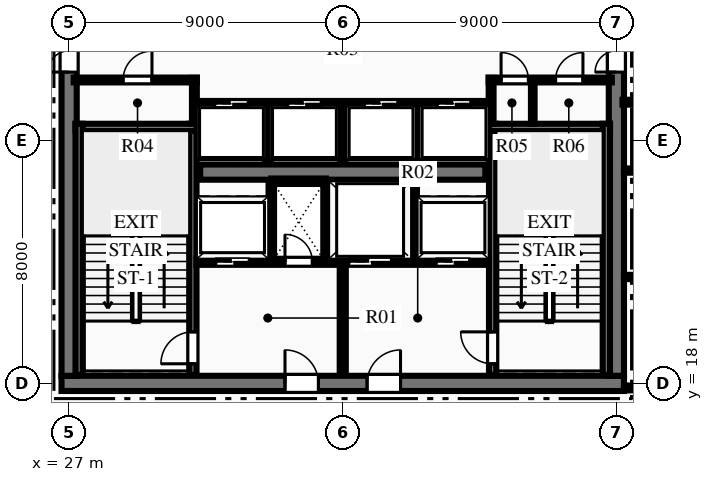
"""IFC4 building model, lengths in metres.
Left out: names, types, materials, properties, quantities, classifications, styles, units other than length and angle.
Written with IfcOpenShell. Run it as: python <this file> out.ifc"""

import sys

from ifc_helpers import new_model, si_unit, direction, frame, frame_2d, origin, place, context, subcontext, project, spatial, rectangle, extrude, element, fill, save


model = new_model("IFC4")
c1 = context("Model", 3, precision=1e-05, world=origin(), true_north=direction((0.0, 1.0)))
c2 = subcontext(c1, "Body", "Model", "MODEL_VIEW")
j1 = project(units=[si_unit("LENGTHUNIT", "METRE"), si_unit("PLANEANGLEUNIT", "RADIAN")], contexts=[c1])
p1 = place(None, origin())
s1 = spatial("IfcSite", under=j1, at=p1, CompositionType="ELEMENT")
p2 = place(p1, origin())
s2 = spatial("IfcBuilding", under=s1, at=p2, CompositionType="ELEMENT")
p3 = place(p2, frame((0.0, 0.0, 148.2)))
s3 = spatial("IfcBuildingStorey", under=s2, at=p3, CompositionType="ELEMENT", Elevation=148.2)
p4 = place(p3, frame((26.75, 18.0, 0.0), z_axis=(0.0, 0.0, 1.0), x_axis=(1.0, 0.0, 0.0)))
e1 = element("IfcWall", 1, at=p4, inside=s3, PredefinedType="SHEAR", context=c2, shape_type="SweptSolid", body=[
    extrude(rectangle(XDim=18.5, YDim=0.5, at=frame_2d((9.25, 0.0))), origin(), (0.0, 0.0, 1.0), 3.75),
])
p5 = place(p4, frame((7.35, 0.0, 0.0)))
e2 = element("IfcOpeningElement", 2, at=p5, cuts=e1, PredefinedType="OPENING", context=c2, shape_type="SweptSolid", body=[
    extrude(rectangle(XDim=1.1, YDim=2.15, at=frame_2d((0.55, 1.075))), frame((0.0, 0.26, 0.0), z_axis=(0.0, -1.0, 0.0), x_axis=(1.0, 0.0, 0.0)), (0.0, 0.0, 1.0), 0.52),
])
p6 = place(p4, frame((10.05, 0.0, 0.0)))
e3 = element("IfcOpeningElement", 3, at=p6, cuts=e1, PredefinedType="OPENING", context=c2, shape_type="SweptSolid", body=[
    extrude(rectangle(XDim=1.1, YDim=2.15, at=frame_2d((0.55, 1.075))), frame((0.0, 0.26, 0.0), z_axis=(0.0, -1.0, 0.0), x_axis=(1.0, 0.0, 0.0)), (0.0, 0.0, 1.0), 0.52),
])
p7 = place(p3, frame((27.0, 18.25, 0.0), z_axis=(0.0, 0.0, 1.0), x_axis=(0.0, 1.0, 0.0)))
e4 = element("IfcWall", 4, at=p7, inside=s3, PredefinedType="SHEAR", context=c2, shape_type="SweptSolid", body=[
    extrude(rectangle(XDim=15.5, YDim=0.5, at=frame_2d((7.75, 0.0))), origin(), (0.0, 0.0, 1.0), 3.75),
])
p8 = place(p7, frame((9.99, 0.0, 0.0)))
e5 = element("IfcOpeningElement", 5, at=p8, cuts=e4, PredefinedType="OPENING", context=c2, shape_type="SweptSolid", body=[
    extrude(rectangle(XDim=1.4, YDim=2.2, at=frame_2d((0.7, 1.1))), frame((0.0, 0.26, 0.0), z_axis=(0.0, -1.0, 0.0), x_axis=(1.0, 0.0, 0.0)), (0.0, 0.0, 1.0), 0.52),
])
p9 = place(p3, frame((45.0, 18.25, 0.0), z_axis=(0.0, 0.0, 1.0), x_axis=(0.0, 1.0, 0.0)))
e6 = element("IfcWall", 6, at=p9, inside=s3, PredefinedType="SHEAR", context=c2, shape_type="SweptSolid", body=[
    extrude(rectangle(XDim=15.5, YDim=0.5, at=frame_2d((7.75, 0.0))), origin(), (0.0, 0.0, 1.0), 3.75),
])
p10 = place(p9, frame((9.99, 0.0, 0.0)))
e7 = element("IfcOpeningElement", 7, at=p10, cuts=e6, PredefinedType="OPENING", context=c2, shape_type="SweptSolid", body=[
    extrude(rectangle(XDim=1.4, YDim=2.2, at=frame_2d((0.7, 1.1))), frame((0.0, 0.26, 0.0), z_axis=(0.0, -1.0, 0.0), x_axis=(1.0, 0.0, 0.0)), (0.0, 0.0, 1.0), 0.52),
])
p11 = place(p3, frame((31.31, 24.95, 0.0), z_axis=(0.0, 0.0, 1.0), x_axis=(1.0, 0.0, 0.0)))
e8 = element("IfcWall", 8, at=p11, inside=s3, PredefinedType="SHEAR", context=c2, shape_type="SweptSolid", body=[
    extrude(rectangle(XDim=9.38, YDim=0.5, at=frame_2d((4.69, 0.0))), origin(), (0.0, 0.0, 1.0), 3.75),
])
p12 = place(p3, frame((31.07, 18.28, 0.0), z_axis=(0.0, 0.0, 1.0), x_axis=(0.0, 1.0, 0.0)))
e9 = element("IfcWall", 9, at=p12, inside=s3, PredefinedType="SHEAR", context=c2, shape_type="SweptSolid", body=[
    extrude(rectangle(XDim=8.26, YDim=0.24, at=frame_2d((4.13, 0.0))), origin(), (0.0, 0.0, 1.0), 3.75),
])
p13 = place(p12, frame((0.365, 0.0, 0.0)))
e10 = element("IfcOpeningElement", 10, at=p13, cuts=e9, PredefinedType="OPENING", context=c2, shape_type="SweptSolid", body=[
    extrude(rectangle(XDim=1.05, YDim=2.15, at=frame_2d((0.525, 1.075))), frame((0.0, 0.13, 0.0), z_axis=(0.0, -1.0, 0.0), x_axis=(1.0, 0.0, 0.0)), (0.0, 0.0, 1.0), 0.26),
])
p14 = place(p3, frame((27.21, 26.42, 0.0), z_axis=(0.0, 0.0, 1.0), x_axis=(1.0, 0.0, 0.0)))
e11 = element("IfcWall", 11, at=p14, inside=s3, PredefinedType="SHEAR", context=c2, shape_type="SweptSolid", body=[
    extrude(rectangle(XDim=3.98, YDim=0.24, at=frame_2d((1.99, 0.0))), origin(), (0.0, 0.0, 1.0), 3.75),
])
p15 = place(p3, frame((27.33, 18.28, 0.0), z_axis=(0.0, 0.0, 1.0), x_axis=(0.0, 1.0, 0.0)))
e12 = element("IfcWall", 12, at=p15, inside=s3, PredefinedType="SHEAR", context=c2, shape_type="SweptSolid", body=[
    extrude(rectangle(XDim=8.26, YDim=0.24, at=frame_2d((4.13, 0.0))), origin(), (0.0, 0.0, 1.0), 3.75),
])
p16 = place(p3, frame((40.93, 18.28, 0.0), z_axis=(0.0, 0.0, 1.0), x_axis=(0.0, 1.0, 0.0)))
e13 = element("IfcWall", 13, at=p16, inside=s3, PredefinedType="SHEAR", context=c2, shape_type="SweptSolid", body=[
    extrude(rectangle(XDim=8.26, YDim=0.24, at=frame_2d((4.13, 0.0))), origin(), (0.0, 0.0, 1.0), 3.75),
])
p17 = place(p16, frame((0.365, 0.0, 0.0)))
e14 = element("IfcOpeningElement", 14, at=p17, cuts=e13, PredefinedType="OPENING", context=c2, shape_type="SweptSolid", body=[
    extrude(rectangle(XDim=1.05, YDim=2.15, at=frame_2d((0.525, 1.075))), frame((0.0, 0.13, 0.0), z_axis=(0.0, -1.0, 0.0), x_axis=(1.0, 0.0, 0.0)), (0.0, 0.0, 1.0), 0.26),
])
p18 = place(p3, frame((40.81, 26.42, 0.0), z_axis=(0.0, 0.0, 1.0), x_axis=(1.0, 0.0, 0.0)))
e15 = element("IfcWall", 15, at=p18, inside=s3, PredefinedType="SHEAR", context=c2, shape_type="SweptSolid", body=[
    extrude(rectangle(XDim=3.98, YDim=0.24, at=frame_2d((1.99, 0.0))), origin(), (0.0, 0.0, 1.0), 3.75),
])
p19 = place(p3, frame((44.67, 18.28, 0.0), z_axis=(0.0, 0.0, 1.0), x_axis=(0.0, 1.0, 0.0)))
e16 = element("IfcWall", 16, at=p19, inside=s3, PredefinedType="SHEAR", context=c2, shape_type="SweptSolid", body=[
    extrude(rectangle(XDim=8.26, YDim=0.24, at=frame_2d((4.13, 0.0))), origin(), (0.0, 0.0, 1.0), 3.75),
])
p20 = place(p3, frame((36.0, 18.28, 0.0), z_axis=(0.0, 0.0, 1.0), x_axis=(0.0, 1.0, 0.0)))
e17 = element("IfcWall", 17, at=p20, inside=s3, PredefinedType="PARTITIONING", context=c2, shape_type="SweptSolid", body=[
    extrude(rectangle(XDim=3.77, YDim=0.2, at=frame_2d((1.885, 0.0))), origin(), (0.0, 0.0, 1.0), 3.46),
])
p21 = place(p3, frame((31.19, 22.0, 0.0), z_axis=(0.0, 0.0, 1.0), x_axis=(1.0, 0.0, 0.0)))
e18 = element("IfcWall", 18, at=p21, inside=s3, PredefinedType="PARTITIONING", context=c2, shape_type="SweptSolid", body=[
    extrude(rectangle(XDim=4.69, YDim=0.2, at=frame_2d((2.345, 0.0))), origin(), (0.0, 0.0, 1.0), 3.46),
])
p22 = place(p21, frame((2.91, 0.0, 0.0)))
e19 = element("IfcOpeningElement", 19, at=p22, cuts=e18, PredefinedType="OPENING", context=c2, shape_type="SweptSolid", body=[
    extrude(rectangle(XDim=0.9, YDim=2.15, at=frame_2d((0.45, 1.075))), frame((0.0, 0.11, 0.0), z_axis=(0.0, -1.0, 0.0), x_axis=(1.0, 0.0, 0.0)), (0.0, 0.0, 1.0), 0.22),
])
p23 = place(p21, frame((0.635, 0.0, 0.0)))
e20 = element("IfcOpeningElement", 20, at=p23, cuts=e18, PredefinedType="OPENING", context=c2, shape_type="SweptSolid", body=[
    extrude(rectangle(XDim=1.1, YDim=2.15, at=frame_2d((0.55, 1.075))), frame((0.0, 0.11, 0.0), z_axis=(0.0, -1.0, 0.0), x_axis=(1.0, 0.0, 0.0)), (0.0, 0.0, 1.0), 0.22),
])
p24 = place(p3, frame((36.12, 22.0, 0.0), z_axis=(0.0, 0.0, 1.0), x_axis=(1.0, 0.0, 0.0)))
e21 = element("IfcWall", 21, at=p24, inside=s3, PredefinedType="PARTITIONING", context=c2, shape_type="SweptSolid", body=[
    extrude(rectangle(XDim=4.69, YDim=0.2, at=frame_2d((2.345, 0.0))), origin(), (0.0, 0.0, 1.0), 3.46),
])
p25 = place(p24, frame((2.955, 0.0, 0.0)))
e22 = element("IfcOpeningElement", 22, at=p25, cuts=e21, PredefinedType="OPENING", context=c2, shape_type="SweptSolid", body=[
    extrude(rectangle(XDim=1.1, YDim=2.15, at=frame_2d((0.55, 1.075))), frame((0.0, 0.11, 0.0), z_axis=(0.0, -1.0, 0.0), x_axis=(1.0, 0.0, 0.0)), (0.0, 0.0, 1.0), 0.22),
])
p26 = place(p24, frame((0.08, 0.0, 0.0)))
e23 = element("IfcOpeningElement", 23, at=p26, cuts=e21, PredefinedType="OPENING", context=c2, shape_type="SweptSolid", body=[
    extrude(rectangle(XDim=1.4, YDim=2.2, at=frame_2d((0.7, 1.1))), frame((0.0, 0.11, 0.0), z_axis=(0.0, -1.0, 0.0), x_axis=(1.0, 0.0, 0.0)), (0.0, 0.0, 1.0), 0.22),
])
for number, where, z_axis, x_axis in (
    (24, (33.65, 22.05, 0.0), (0.0, 0.0, 1.0), (0.0, 1.0, 0.0)),
    (25, (35.45, 22.05, 0.0), (0.0, 0.0, 1.0), (0.0, 1.0, 0.0)),
):
    element("IfcWall", number, at=place(p3, frame(where, z_axis=z_axis, x_axis=x_axis)), inside=s3, PredefinedType="PARTITIONING", context=c2, shape_type="SweptSolid", body=[
        extrude(rectangle(XDim=2.6, YDim=0.18, at=frame_2d((1.3, 0.0))), origin(), (0.0, 0.0, 1.0), 3.46),
    ])
p27 = place(p3, frame((33.65, 24.65, 0.0), z_axis=(0.0, 0.0, 1.0), x_axis=(1.0, 0.0, 0.0)))
e26 = element("IfcWall", 26, at=p27, inside=s3, PredefinedType="PARTITIONING", context=c2, shape_type="SweptSolid", body=[
    extrude(rectangle(XDim=1.8, YDim=0.18, at=frame_2d((0.9, 0.0))), origin(), (0.0, 0.0, 1.0), 3.46),
])
p28 = place(p3, frame((38.35, 22.05, 0.0), z_axis=(0.0, 0.0, 1.0), x_axis=(0.0, 1.0, 0.0)))
e27 = element("IfcWall", 27, at=p28, inside=s3, PredefinedType="PARTITIONING", context=c2, shape_type="SweptSolid", body=[
    extrude(rectangle(XDim=2.6, YDim=0.18, at=frame_2d((1.3, 0.0))), origin(), (0.0, 0.0, 1.0), 3.46),
])
p29 = place(p3, frame((27.15, 27.98, 0.0), z_axis=(0.0, 0.0, 1.0), x_axis=(1.0, 0.0, 0.0)))
e28 = element("IfcWall", 28, at=p29, inside=s3, PredefinedType="PARTITIONING", context=c2, shape_type="SweptSolid", body=[
    extrude(rectangle(XDim=4.05, YDim=0.16, at=frame_2d((2.025, 0.0))), origin(), (0.0, 0.0, 1.0), 3.46),
])
p30 = place(p29, frame((1.625, 0.0, 0.0)))
e29 = element("IfcOpeningElement", 29, at=p30, cuts=e28, PredefinedType="OPENING", context=c2, shape_type="SweptSolid", body=[
    extrude(rectangle(XDim=0.95, YDim=2.15, at=frame_2d((0.475, 1.075))), frame((0.0, 0.09, 0.0), z_axis=(0.0, -1.0, 0.0), x_axis=(1.0, 0.0, 0.0)), (0.0, 0.0, 1.0), 0.18),
])
p31 = place(p3, frame((31.12, 26.54, 0.0), z_axis=(0.0, 0.0, 1.0), x_axis=(0.0, 1.0, 0.0)))
e30 = element("IfcWall", 30, at=p31, inside=s3, PredefinedType="PARTITIONING", context=c2, shape_type="SweptSolid", body=[
    extrude(rectangle(XDim=1.51, YDim=0.16, at=frame_2d((0.755, 0.0))), origin(), (0.0, 0.0, 1.0), 3.46),
])
p32 = place(p3, frame((40.8, 27.98, 0.0), z_axis=(0.0, 0.0, 1.0), x_axis=(1.0, 0.0, 0.0)))
e31 = element("IfcWall", 31, at=p32, inside=s3, PredefinedType="PARTITIONING", context=c2, shape_type="SweptSolid", body=[
    extrude(rectangle(XDim=4.05, YDim=0.16, at=frame_2d((2.025, 0.0))), origin(), (0.0, 0.0, 1.0), 3.46),
])
p33 = place(p32, frame((0.407, 0.0, 0.0)))
e32 = element("IfcOpeningElement", 32, at=p33, cuts=e31, PredefinedType="OPENING", context=c2, shape_type="SweptSolid", body=[
    extrude(rectangle(XDim=0.9, YDim=2.15, at=frame_2d((0.45, 1.075))), frame((0.0, 0.09, 0.0), z_axis=(0.0, -1.0, 0.0), x_axis=(1.0, 0.0, 0.0)), (0.0, 0.0, 1.0), 0.18),
])
p34 = place(p32, frame((2.2, 0.0, 0.0)))
e33 = element("IfcOpeningElement", 33, at=p34, cuts=e31, PredefinedType="OPENING", context=c2, shape_type="SweptSolid", body=[
    extrude(rectangle(XDim=0.9, YDim=2.15, at=frame_2d((0.45, 1.075))), frame((0.0, 0.09, 0.0), z_axis=(0.0, -1.0, 0.0), x_axis=(1.0, 0.0, 0.0)), (0.0, 0.0, 1.0), 0.18),
])
p35 = place(p3, frame((40.88, 26.54, 0.0), z_axis=(0.0, 0.0, 1.0), x_axis=(0.0, 1.0, 0.0)))
e34 = element("IfcWall", 34, at=p35, inside=s3, PredefinedType="PARTITIONING", context=c2, shape_type="SweptSolid", body=[
    extrude(rectangle(XDim=1.51, YDim=0.16, at=frame_2d((0.755, 0.0))), origin(), (0.0, 0.0, 1.0), 3.46),
])
p36 = place(p3, frame((42.25, 26.54, 0.0), z_axis=(0.0, 0.0, 1.0), x_axis=(0.0, 1.0, 0.0)))
e35 = element("IfcWall", 35, at=p36, inside=s3, PredefinedType="PARTITIONING", context=c2, shape_type="SweptSolid", body=[
    extrude(rectangle(XDim=1.44, YDim=0.12, at=frame_2d((0.72, 0.0))), origin(), (0.0, 0.0, 1.0), 3.46),
])
p37 = place(p3, frame((31.2, 27.2, 0.0), z_axis=(0.0, 0.0, 1.0), x_axis=(1.0, 0.0, 0.0)))
e36 = element("IfcWall", 36, at=p37, inside=s3, PredefinedType="PARTITIONING", context=c2, shape_type="SweptSolid", body=[
    extrude(rectangle(XDim=9.6, YDim=0.18, at=frame_2d((4.8, 0.0))), origin(), (0.0, 0.0, 1.0), 3.46),
])
p38 = place(p37, frame((0.59, 0.0, 0.0)))
e37 = element("IfcOpeningElement", 37, at=p38, cuts=e36, PredefinedType="OPENING", context=c2, shape_type="SweptSolid", body=[
    extrude(rectangle(XDim=1.1, YDim=2.15, at=frame_2d((0.55, 1.075))), frame((0.0, 0.1, 0.0), z_axis=(0.0, -1.0, 0.0), x_axis=(1.0, 0.0, 0.0)), (0.0, 0.0, 1.0), 0.2),
])
p39 = place(p37, frame((2.99, 0.0, 0.0)))
e38 = element("IfcOpeningElement", 38, at=p39, cuts=e36, PredefinedType="OPENING", context=c2, shape_type="SweptSolid", body=[
    extrude(rectangle(XDim=1.1, YDim=2.15, at=frame_2d((0.55, 1.075))), frame((0.0, 0.1, 0.0), z_axis=(0.0, -1.0, 0.0), x_axis=(1.0, 0.0, 0.0)), (0.0, 0.0, 1.0), 0.2),
])
p40 = place(p37, frame((5.51, 0.0, 0.0)))
e39 = element("IfcOpeningElement", 39, at=p40, cuts=e36, PredefinedType="OPENING", context=c2, shape_type="SweptSolid", body=[
    extrude(rectangle(XDim=1.1, YDim=2.15, at=frame_2d((0.55, 1.075))), frame((0.0, 0.1, 0.0), z_axis=(0.0, -1.0, 0.0), x_axis=(1.0, 0.0, 0.0)), (0.0, 0.0, 1.0), 0.2),
])
p41 = place(p37, frame((7.91, 0.0, 0.0)))
e40 = element("IfcOpeningElement", 40, at=p41, cuts=e36, PredefinedType="OPENING", context=c2, shape_type="SweptSolid", body=[
    extrude(rectangle(XDim=1.1, YDim=2.15, at=frame_2d((0.55, 1.075))), frame((0.0, 0.1, 0.0), z_axis=(0.0, -1.0, 0.0), x_axis=(1.0, 0.0, 0.0)), (0.0, 0.0, 1.0), 0.2),
])
for number, where, z_axis, x_axis in (
    (41, (33.54, 25.3, 0.0), (0.0, 0.0, 1.0), (0.0, 1.0, 0.0)),
    (42, (36.0, 25.3, 0.0), (0.0, 0.0, 1.0), (0.0, 1.0, 0.0)),
    (43, (38.46, 25.3, 0.0), (0.0, 0.0, 1.0), (0.0, 1.0, 0.0)),
):
    element("IfcWall", number, at=place(p3, frame(where, z_axis=z_axis, x_axis=x_axis)), inside=s3, PredefinedType="PARTITIONING", context=c2, shape_type="SweptSolid", body=[
        extrude(rectangle(XDim=1.9, YDim=0.18, at=frame_2d((0.95, 0.0))), origin(), (0.0, 0.0, 1.0), 3.46),
    ])
p42 = place(p3, frame((45.25, 17.85, 0.0), z_axis=(0.0, 0.0, 1.0), x_axis=(1.0, 0.0, 0.0)))
e44 = element("IfcWall", 44, at=p42, inside=s3, PredefinedType="PARTITIONING", context=c2, shape_type="SweptSolid", body=[
    extrude(rectangle(XDim=8.55, YDim=0.16, at=frame_2d((4.275, 0.0))), origin(), (0.0, 0.0, 1.0), 2.998),
])
p43 = place(p42, frame((2.211, 0.0, 0.0)))
e45 = element("IfcOpeningElement", 45, at=p43, cuts=e44, PredefinedType="OPENING", context=c2, shape_type="SweptSolid", body=[
    extrude(rectangle(XDim=1.05, YDim=2.15, at=frame_2d((0.525, 1.075))), frame((0.0, 0.09, 0.0), z_axis=(0.0, -1.0, 0.0), x_axis=(1.0, 0.0, 0.0)), (0.0, 0.0, 1.0), 0.18),
])
p44 = place(p3, frame((45.2, 27.25, 0.0), z_axis=(0.0, 0.0, 1.0), x_axis=(1.0, 0.0, 0.0)))
e46 = element("IfcWall", 46, at=p44, inside=s3, PredefinedType="PARTITIONING", context=c2, shape_type="SweptSolid", body=[
    extrude(rectangle(XDim=2.25, YDim=0.16, at=frame_2d((1.125, 0.0))), origin(), (0.0, 0.0, 1.0), 3.46),
])
p45 = place(p3, frame((45.25, 21.5, 0.0), z_axis=(0.0, 0.0, 1.0), x_axis=(1.0, 0.0, 0.0)))
e47 = element("IfcWall", 47, at=p45, inside=s3, PredefinedType="PARTITIONING", context=c2, shape_type="SweptSolid", body=[
    extrude(rectangle(XDim=20.018, YDim=0.14, at=frame_2d((10.009, 0.0))), origin(), (0.0, 0.0, 1.0), 3.46),
])
p46 = place(p45, frame((5.383, 0.0, 0.0)))
e48 = element("IfcOpeningElement", 48, at=p46, cuts=e47, PredefinedType="OPENING", context=c2, shape_type="SweptSolid", body=[
    extrude(rectangle(XDim=0.95, YDim=2.15, at=frame_2d((0.475, 1.075))), frame((0.0, 0.08, 0.0), z_axis=(0.0, -1.0, 0.0), x_axis=(1.0, 0.0, 0.0)), (0.0, 0.0, 1.0), 0.16),
])
p47 = place(p3, frame((45.25, 25.0, 0.0), z_axis=(0.0, 0.0, 1.0), x_axis=(1.0, 0.0, 0.0)))
e49 = element("IfcWall", 49, at=p47, inside=s3, PredefinedType="PARTITIONING", context=c2, shape_type="SweptSolid", body=[
    extrude(rectangle(XDim=22.43, YDim=0.14, at=frame_2d((11.215, 0.0))), origin(), (0.0, 0.0, 1.0), 2.839),
])
p48 = place(p30, origin())
e50 = element("IfcDoor", 50, at=p48, inside=s3, OperationType="SINGLE_SWING_RIGHT", PredefinedType="DOOR", context=c2, shape_type="SweptSolid", body=[
    extrude(rectangle(XDim=0.95, YDim=2.15, at=frame_2d((0.475, 1.075))), frame((0.0, 0.025, 0.0), z_axis=(0.0, -1.0, 0.0), x_axis=(1.0, 0.0, 0.0)), (0.0, 0.0, 1.0), 0.05),
])
fill(e29, e50)
p49 = place(p33, origin())
e51 = element("IfcDoor", 51, at=p49, inside=s3, OperationType="SINGLE_SWING_LEFT", PredefinedType="DOOR", context=c2, shape_type="SweptSolid", body=[
    extrude(rectangle(XDim=0.9, YDim=2.15, at=frame_2d((0.45, 1.075))), frame((0.0, 0.025, 0.0), z_axis=(0.0, -1.0, 0.0), x_axis=(1.0, 0.0, 0.0)), (0.0, 0.0, 1.0), 0.05),
])
fill(e32, e51)
p50 = place(p34, origin())
e52 = element("IfcDoor", 52, at=p50, inside=s3, OperationType="SINGLE_SWING_RIGHT", PredefinedType="DOOR", context=c2, shape_type="SweptSolid", body=[
    extrude(rectangle(XDim=0.9, YDim=2.15, at=frame_2d((0.45, 1.075))), frame((0.0, 0.025, 0.0), z_axis=(0.0, -1.0, 0.0), x_axis=(1.0, 0.0, 0.0)), (0.0, 0.0, 1.0), 0.05),
])
fill(e33, e52)
p51 = place(p13, origin())
e53 = element("IfcDoor", 53, at=p51, inside=s3, OperationType="SINGLE_SWING_LEFT", PredefinedType="DOOR", context=c2, shape_type="SweptSolid", body=[
    extrude(rectangle(XDim=1.05, YDim=2.15, at=frame_2d((0.525, 1.075))), frame((0.0, 0.025, 0.0), z_axis=(0.0, -1.0, 0.0), x_axis=(1.0, 0.0, 0.0)), (0.0, 0.0, 1.0), 0.05),
])
fill(e10, e53)
p52 = place(p17, origin())
e54 = element("IfcDoor", 54, at=p52, inside=s3, OperationType="SINGLE_SWING_RIGHT", PredefinedType="DOOR", context=c2, shape_type="SweptSolid", body=[
    extrude(rectangle(XDim=1.05, YDim=2.15, at=frame_2d((0.525, 1.075))), frame((0.0, 0.025, 0.0), z_axis=(0.0, -1.0, 0.0), x_axis=(1.0, 0.0, 0.0)), (0.0, 0.0, 1.0), 0.05),
])
fill(e14, e54)
p53 = place(p5, origin())
e55 = element("IfcDoor", 55, at=p53, inside=s3, OperationType="SINGLE_SWING_LEFT", PredefinedType="DOOR", context=c2, shape_type="SweptSolid", body=[
    extrude(rectangle(XDim=1.1, YDim=2.15, at=frame_2d((0.55, 1.075))), frame((0.0, 0.025, 0.0), z_axis=(0.0, -1.0, 0.0), x_axis=(1.0, 0.0, 0.0)), (0.0, 0.0, 1.0), 0.05),
])
fill(e2, e55)
p54 = place(p6, origin())
e56 = element("IfcDoor", 56, at=p54, inside=s3, OperationType="SINGLE_SWING_RIGHT", PredefinedType="DOOR", context=c2, shape_type="SweptSolid", body=[
    extrude(rectangle(XDim=1.1, YDim=2.15, at=frame_2d((0.55, 1.075))), frame((0.0, 0.025, 0.0), z_axis=(0.0, -1.0, 0.0), x_axis=(1.0, 0.0, 0.0)), (0.0, 0.0, 1.0), 0.05),
])
fill(e3, e56)
p55 = place(p22, origin())
e57 = element("IfcDoor", 57, at=p55, inside=s3, OperationType="SINGLE_SWING_LEFT", PredefinedType="DOOR", context=c2, shape_type="SweptSolid", body=[
    extrude(rectangle(XDim=0.9, YDim=2.15, at=frame_2d((0.45, 1.075))), frame((0.0, 0.025, 0.0), z_axis=(0.0, -1.0, 0.0), x_axis=(1.0, 0.0, 0.0)), (0.0, 0.0, 1.0), 0.05),
])
fill(e19, e57)
p56 = place(p8, origin())
e58 = element("IfcDoor", 58, at=p56, inside=s3, OperationType="DOUBLE_DOOR_SINGLE_SWING", PredefinedType="DOOR", context=c2, shape_type="SweptSolid", body=[
    extrude(rectangle(XDim=1.4, YDim=2.2, at=frame_2d((0.7, 1.1))), frame((0.0, 0.025, 0.0), z_axis=(0.0, -1.0, 0.0), x_axis=(1.0, 0.0, 0.0)), (0.0, 0.0, 1.0), 0.05),
])
fill(e5, e58)
p57 = place(p10, origin())
e59 = element("IfcDoor", 59, at=p57, inside=s3, OperationType="DOUBLE_DOOR_SINGLE_SWING", PredefinedType="DOOR", context=c2, shape_type="SweptSolid", body=[
    extrude(rectangle(XDim=1.4, YDim=2.2, at=frame_2d((0.7, 1.1))), frame((0.0, 0.025, 0.0), z_axis=(0.0, -1.0, 0.0), x_axis=(1.0, 0.0, 0.0)), (0.0, 0.0, 1.0), 0.05),
])
fill(e7, e59)
p58 = place(p38, origin())
e60 = element("IfcDoor", 60, at=p58, inside=s3, OperationType="SLIDING_TO_LEFT", PredefinedType="DOOR", context=c2, shape_type="SweptSolid", body=[
    extrude(rectangle(XDim=1.1, YDim=2.15, at=frame_2d((0.55, 1.075))), frame((0.0, 0.025, 0.0), z_axis=(0.0, -1.0, 0.0), x_axis=(1.0, 0.0, 0.0)), (0.0, 0.0, 1.0), 0.05),
])
fill(e37, e60)
p59 = place(p39, origin())
e61 = element("IfcDoor", 61, at=p59, inside=s3, OperationType="SLIDING_TO_LEFT", PredefinedType="DOOR", context=c2, shape_type="SweptSolid", body=[
    extrude(rectangle(XDim=1.1, YDim=2.15, at=frame_2d((0.55, 1.075))), frame((0.0, 0.025, 0.0), z_axis=(0.0, -1.0, 0.0), x_axis=(1.0, 0.0, 0.0)), (0.0, 0.0, 1.0), 0.05),
])
fill(e38, e61)
p60 = place(p40, origin())
e62 = element("IfcDoor", 62, at=p60, inside=s3, OperationType="SLIDING_TO_LEFT", PredefinedType="DOOR", context=c2, shape_type="SweptSolid", body=[
    extrude(rectangle(XDim=1.1, YDim=2.15, at=frame_2d((0.55, 1.075))), frame((0.0, 0.025, 0.0), z_axis=(0.0, -1.0, 0.0), x_axis=(1.0, 0.0, 0.0)), (0.0, 0.0, 1.0), 0.05),
])
fill(e39, e62)
p61 = place(p41, origin())
e63 = element("IfcDoor", 63, at=p61, inside=s3, OperationType="SLIDING_TO_LEFT", PredefinedType="DOOR", context=c2, shape_type="SweptSolid", body=[
    extrude(rectangle(XDim=1.1, YDim=2.15, at=frame_2d((0.55, 1.075))), frame((0.0, 0.025, 0.0), z_axis=(0.0, -1.0, 0.0), x_axis=(1.0, 0.0, 0.0)), (0.0, 0.0, 1.0), 0.05),
])
fill(e40, e63)
p62 = place(p23, origin())
e64 = element("IfcDoor", 64, at=p62, inside=s3, OperationType="SLIDING_TO_LEFT", PredefinedType="DOOR", context=c2, shape_type="SweptSolid", body=[
    extrude(rectangle(XDim=1.1, YDim=2.15, at=frame_2d((0.55, 1.075))), frame((0.0, 0.025, 0.0), z_axis=(0.0, -1.0, 0.0), x_axis=(1.0, 0.0, 0.0)), (0.0, 0.0, 1.0), 0.05),
])
fill(e20, e64)
p63 = place(p25, origin())
e65 = element("IfcDoor", 65, at=p63, inside=s3, OperationType="SLIDING_TO_LEFT", PredefinedType="DOOR", context=c2, shape_type="SweptSolid", body=[
    extrude(rectangle(XDim=1.1, YDim=2.15, at=frame_2d((0.55, 1.075))), frame((0.0, 0.025, 0.0), z_axis=(0.0, -1.0, 0.0), x_axis=(1.0, 0.0, 0.0)), (0.0, 0.0, 1.0), 0.05),
])
fill(e22, e65)
p64 = place(p26, origin())
e66 = element("IfcDoor", 66, at=p64, inside=s3, OperationType="SLIDING_TO_LEFT", PredefinedType="DOOR", context=c2, shape_type="SweptSolid", body=[
    extrude(rectangle(XDim=1.4, YDim=2.2, at=frame_2d((0.7, 1.1))), frame((0.0, 0.025, 0.0), z_axis=(0.0, -1.0, 0.0), x_axis=(1.0, 0.0, 0.0)), (0.0, 0.0, 1.0), 0.05),
])
fill(e23, e66)
save(model, sys.argv[1])
